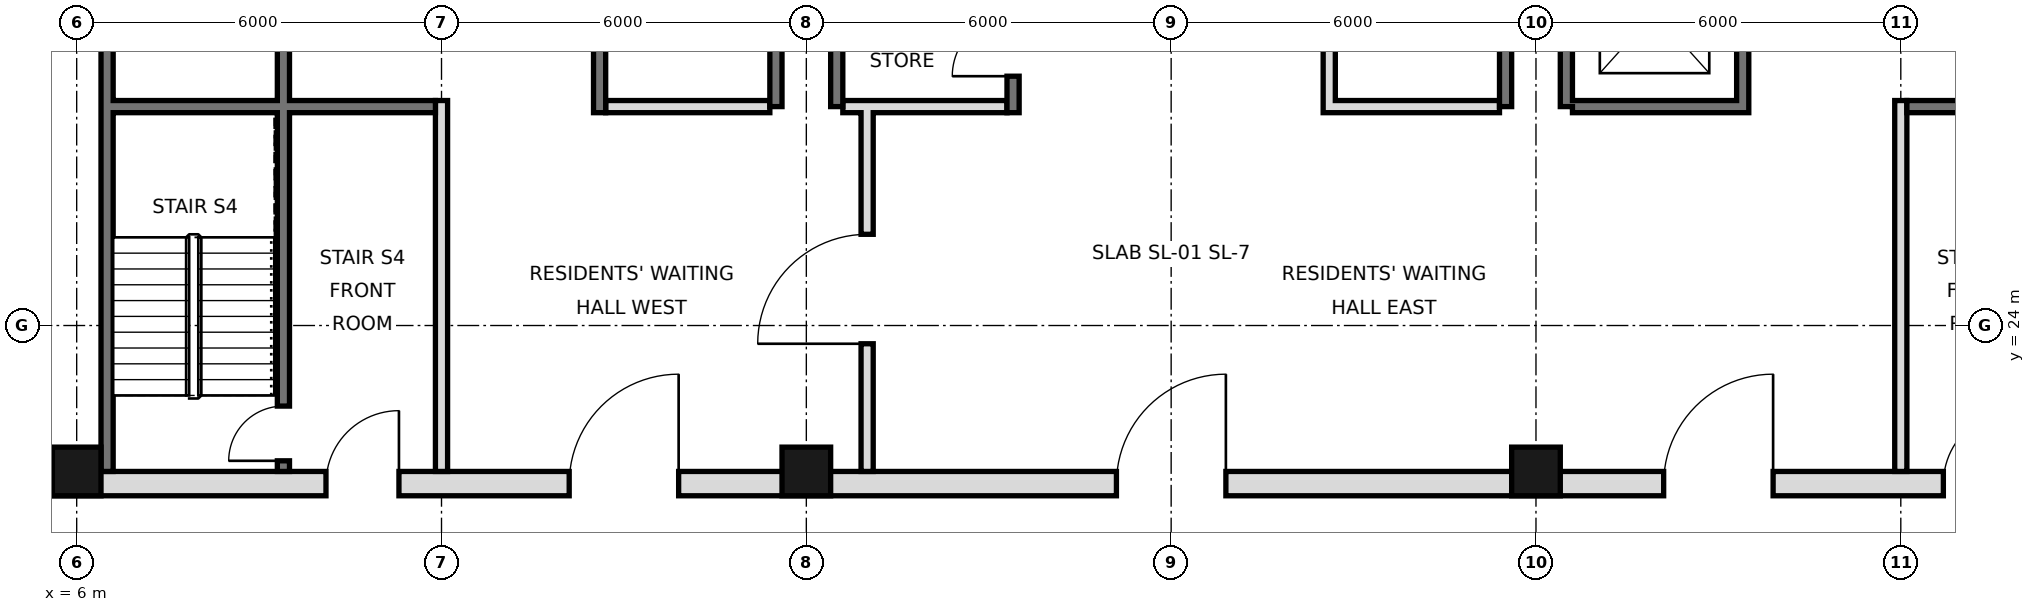
"""IFC4 building model, lengths in metres.
Left out: names, types, materials, properties, quantities, classifications, styles, units other than length and angle.
Written with IfcOpenShell. Run it as: python <this file> out.ifc"""

import sys

from ifc_helpers import new_model, si_unit, direction, frame, frame_2d, origin, origin_2d, place, context, subcontext, project, spatial, rectangle, hollow_rectangle, extrude, element, fill, save


model = new_model("IFC4")
c1 = context("Model", 3, precision=1e-05, world=origin(), true_north=direction((0.0, 1.0)))
c2 = subcontext(c1, "Body", "Model", "MODEL_VIEW")
j1 = project(units=[si_unit("LENGTHUNIT", "METRE"), si_unit("PLANEANGLEUNIT", "RADIAN")], contexts=[c1])
p1 = place(None, origin())
s1 = spatial("IfcSite", under=j1, at=p1, CompositionType="ELEMENT")
p2 = place(p1, origin())
s2 = spatial("IfcBuilding", under=s1, at=p2, CompositionType="ELEMENT")
p3 = place(p2, frame((0.0, 0.0, 243.2)))
s3 = spatial("IfcBuildingStorey", under=s2, at=p3, CompositionType="ELEMENT", Elevation=243.2)
for number, where, z_axis, x_axis in (
    (1, (6.0, 21.6, 0.0), (0.0, 0.0, 1.0), (1.0, 0.0, 0.0)),
    (2, (18.0, 21.6, 0.0), (0.0, 0.0, 1.0), (1.0, 0.0, 0.0)),
    (3, (30.0, 21.6, 0.0), (0.0, 0.0, 1.0), (1.0, 0.0, 0.0)),
):
    element("IfcColumn", number, at=place(p3, frame(where, z_axis=z_axis, x_axis=x_axis)), inside=s3, PredefinedType="COLUMN", context=c2, shape_type="SweptSolid", body=[
        extrude(hollow_rectangle(XDim=0.8, YDim=0.8, WallThickness=0.04, at=origin_2d()), origin(), (0.0, 0.0, 1.0), 3.6),
    ])
p4 = place(p3, frame((6.5, 21.6, 0.0), z_axis=(0.0, 0.0, 1.0), x_axis=(0.0, 1.0, 0.0)))
e4 = element("IfcWall", 4, at=p4, inside=s3, PredefinedType="SOLIDWALL", context=c2, shape_type="SweptSolid", body=[
    extrude(rectangle(XDim=23.5, YDim=0.2, at=frame_2d((11.75, 0.0))), origin(), (0.0, 0.0, 1.0), 3.42),
])
for number, where, z_axis, x_axis in (
    (5, (17.5, 27.6, 0.0), (0.0, 0.0, 1.0), (0.0, 1.0, 0.0)),
    (6, (18.5, 27.6, 0.0), (0.0, 0.0, 1.0), (0.0, 1.0, 0.0)),
    (7, (29.5, 27.6, 0.0), (0.0, 0.0, 1.0), (0.0, 1.0, 0.0)),
    (8, (30.5, 27.6, 0.0), (0.0, 0.0, 1.0), (0.0, 1.0, 0.0)),
):
    element("IfcWall", number, at=place(p3, frame(where, z_axis=z_axis, x_axis=x_axis)), inside=s3, PredefinedType="SOLIDWALL", context=c2, shape_type="SweptSolid", body=[
        extrude(rectangle(XDim=17.5, YDim=0.2, at=frame_2d((8.75, 0.0))), origin(), (0.0, 0.0, 1.0), 3.42),
    ])
p5 = place(p3, frame((5.6, 21.4, 0.0), z_axis=(0.0, 0.0, 1.0), x_axis=(1.0, 0.0, 0.0)))
e9 = element("IfcWall", 9, at=p5, inside=s3, PredefinedType="SOLIDWALL", context=c2, shape_type="SweptSolid", body=[
    extrude(rectangle(XDim=36.8, YDim=0.4, at=frame_2d((18.4, 0.0))), origin(), (0.0, 0.0, 1.0), 3.42),
])
p6 = place(p5, frame((8.5, 0.0, 0.0)))
e10 = element("IfcOpeningElement", 10, at=p6, cuts=e9, PredefinedType="OPENING", context=c2, shape_type="SweptSolid", body=[
    extrude(rectangle(XDim=1.8, YDim=2.1, at=frame_2d((0.9, 1.05))), frame((0.0, 0.21, 0.0), z_axis=(0.0, -1.0, 0.0), x_axis=(1.0, 0.0, 0.0)), (0.0, 0.0, 1.0), 0.42),
])
p7 = place(p5, frame((17.5, 0.0, 0.0)))
e11 = element("IfcOpeningElement", 11, at=p7, cuts=e9, PredefinedType="OPENING", context=c2, shape_type="SweptSolid", body=[
    extrude(rectangle(XDim=1.8, YDim=2.1, at=frame_2d((0.9, 1.05))), frame((0.0, 0.21, 0.0), z_axis=(0.0, -1.0, 0.0), x_axis=(1.0, 0.0, 0.0)), (0.0, 0.0, 1.0), 0.42),
])
p8 = place(p5, frame((26.5, 0.0, 0.0)))
e12 = element("IfcOpeningElement", 12, at=p8, cuts=e9, PredefinedType="OPENING", context=c2, shape_type="SweptSolid", body=[
    extrude(rectangle(XDim=1.8, YDim=2.1, at=frame_2d((0.9, 1.05))), frame((0.0, 0.21, 0.0), z_axis=(0.0, -1.0, 0.0), x_axis=(1.0, 0.0, 0.0)), (0.0, 0.0, 1.0), 0.42),
])
p9 = place(p5, frame((4.5, 0.0, 0.0)))
e13 = element("IfcOpeningElement", 13, at=p9, cuts=e9, PredefinedType="OPENING", context=c2, shape_type="SweptSolid", body=[
    extrude(rectangle(XDim=1.2, YDim=2.1, at=frame_2d((0.6, 1.05))), frame((0.0, 0.21, 0.0), z_axis=(0.0, -1.0, 0.0), x_axis=(1.0, 0.0, 0.0)), (0.0, 0.0, 1.0), 0.42),
])
p10 = place(p5, frame((31.1, 0.0, 0.0)))
e14 = element("IfcOpeningElement", 14, at=p10, cuts=e9, PredefinedType="OPENING", context=c2, shape_type="SweptSolid", body=[
    extrude(rectangle(XDim=1.2, YDim=2.1, at=frame_2d((0.6, 1.05))), frame((0.0, 0.21, 0.0), z_axis=(0.0, -1.0, 0.0), x_axis=(1.0, 0.0, 0.0)), (0.0, 0.0, 1.0), 0.42),
])
p11 = place(p3, frame((19.0, 21.6, 0.0), z_axis=(0.0, 0.0, 1.0), x_axis=(0.0, 1.0, 0.0)))
e15 = element("IfcWall", 15, at=p11, inside=s3, PredefinedType="PARTITIONING", context=c2, shape_type="SweptSolid", body=[
    extrude(rectangle(XDim=6.0, YDim=0.2, at=frame_2d((3.0, 0.0))), origin(), (0.0, 0.0, 1.0), 3.42),
])
p12 = place(p11, frame((2.1, 0.0, 0.0)))
e16 = element("IfcOpeningElement", 16, at=p12, cuts=e15, PredefinedType="OPENING", context=c2, shape_type="SweptSolid", body=[
    extrude(rectangle(XDim=1.8, YDim=2.1, at=frame_2d((0.9, 1.05))), frame((0.0, 0.11, 0.0), z_axis=(0.0, -1.0, 0.0), x_axis=(1.0, 0.0, 0.0)), (0.0, 0.0, 1.0), 0.22),
])
p13 = place(p3, frame((12.0, 21.6, 0.0), z_axis=(0.0, 0.0, 1.0), x_axis=(0.0, 1.0, 0.0)))
e17 = element("IfcWall", 17, at=p13, inside=s3, PredefinedType="PARTITIONING", context=c2, shape_type="SweptSolid", body=[
    extrude(rectangle(XDim=6.1, YDim=0.2, at=frame_2d((3.05, 0.0))), origin(), (0.0, 0.0, 1.0), 3.42),
])
p14 = place(p3, frame((14.6, 27.5, 0.0), z_axis=(0.0, 0.0, 1.0), x_axis=(0.0, 1.0, 0.0)))
e18 = element("IfcWall", 18, at=p14, inside=s3, PredefinedType="SOLIDWALL", context=c2, shape_type="SweptSolid", body=[
    extrude(rectangle(XDim=17.5, YDim=0.2, at=frame_2d((8.75, 0.0))), origin(), (0.0, 0.0, 1.0), 3.42),
])
p15 = place(p14, frame((15.4, 0.0, 0.0)))
e19 = element("IfcOpeningElement", 19, at=p15, cuts=e18, PredefinedType="OPENING", context=c2, shape_type="SweptSolid", body=[
    extrude(rectangle(XDim=1.1, YDim=2.1, at=frame_2d((0.55, 1.05))), frame((0.0, 0.11, 0.0), z_axis=(0.0, -1.0, 0.0), x_axis=(1.0, 0.0, 0.0)), (0.0, 0.0, 1.0), 0.22),
])
p16 = place(p14, frame((2.7, 0.0, 0.0)))
e20 = element("IfcOpeningElement", 20, at=p16, cuts=e18, PredefinedType="OPENING", context=c2, shape_type="SweptSolid", body=[
    extrude(rectangle(XDim=1.0, YDim=2.1, at=frame_2d((0.5, 1.05))), frame((0.0, 0.11, 0.0), z_axis=(0.0, -1.0, 0.0), x_axis=(1.0, 0.0, 0.0)), (0.0, 0.0, 1.0), 0.22),
])
p17 = place(p14, frame((9.9, 0.0, 0.0)))
e21 = element("IfcOpeningElement", 21, at=p17, cuts=e18, PredefinedType="OPENING", context=c2, shape_type="SweptSolid", body=[
    extrude(rectangle(XDim=0.9, YDim=2.1, at=frame_2d((0.45, 1.05))), frame((0.0, 0.11, 0.0), z_axis=(0.0, -1.0, 0.0), x_axis=(1.0, 0.0, 0.0)), (0.0, 0.0, 1.0), 0.22),
])
p18 = place(p3, frame((21.4, 27.5, 0.0), z_axis=(0.0, 0.0, 1.0), x_axis=(0.0, 1.0, 0.0)))
e22 = element("IfcWall", 22, at=p18, inside=s3, PredefinedType="SOLIDWALL", context=c2, shape_type="SweptSolid", body=[
    extrude(rectangle(XDim=17.5, YDim=0.2, at=frame_2d((8.75, 0.0))), origin(), (0.0, 0.0, 1.0), 3.42),
])
p19 = place(p18, frame((0.6, 0.0, 0.0)))
e23 = element("IfcOpeningElement", 23, at=p19, cuts=e22, PredefinedType="OPENING", context=c2, shape_type="SweptSolid", body=[
    extrude(rectangle(XDim=1.0, YDim=2.1, at=frame_2d((0.5, 1.05))), frame((0.0, 0.11, 0.0), z_axis=(0.0, -1.0, 0.0), x_axis=(1.0, 0.0, 0.0)), (0.0, 0.0, 1.0), 0.22),
])
p20 = place(p18, frame((3.7, 0.0, 0.0)))
e24 = element("IfcOpeningElement", 24, at=p20, cuts=e22, PredefinedType="OPENING", context=c2, shape_type="SweptSolid", body=[
    extrude(rectangle(XDim=1.0, YDim=2.1, at=frame_2d((0.5, 1.05))), frame((0.0, 0.11, 0.0), z_axis=(0.0, -1.0, 0.0), x_axis=(1.0, 0.0, 0.0)), (0.0, 0.0, 1.0), 0.22),
])
p21 = place(p18, frame((9.8, 0.0, 0.0)))
e25 = element("IfcOpeningElement", 25, at=p21, cuts=e22, PredefinedType="OPENING", context=c2, shape_type="SweptSolid", body=[
    extrude(rectangle(XDim=1.0, YDim=2.1, at=frame_2d((0.5, 1.05))), frame((0.0, 0.11, 0.0), z_axis=(0.0, -1.0, 0.0), x_axis=(1.0, 0.0, 0.0)), (0.0, 0.0, 1.0), 0.22),
])
p22 = place(p18, frame((7.4, 0.0, 0.0)))
e26 = element("IfcOpeningElement", 26, at=p22, cuts=e22, PredefinedType="OPENING", context=c2, shape_type="SweptSolid", body=[
    extrude(rectangle(XDim=0.9, YDim=2.1, at=frame_2d((0.45, 1.05))), frame((0.0, 0.11, 0.0), z_axis=(0.0, -1.0, 0.0), x_axis=(1.0, 0.0, 0.0)), (0.0, 0.0, 1.0), 0.22),
])
p23 = place(p3, frame((26.6, 27.5, 0.0), z_axis=(0.0, 0.0, 1.0), x_axis=(0.0, 1.0, 0.0)))
e27 = element("IfcWall", 27, at=p23, inside=s3, PredefinedType="SOLIDWALL", context=c2, shape_type="SweptSolid", body=[
    extrude(rectangle(XDim=17.5, YDim=0.2, at=frame_2d((8.75, 0.0))), origin(), (0.0, 0.0, 1.0), 3.42),
])
p24 = place(p23, frame((4.3, 0.0, 0.0)))
e28 = element("IfcOpeningElement", 28, at=p24, cuts=e27, PredefinedType="OPENING", context=c2, shape_type="SweptSolid", body=[
    extrude(rectangle(XDim=0.9, YDim=2.1, at=frame_2d((0.45, 1.05))), frame((0.0, 0.11, 0.0), z_axis=(0.0, -1.0, 0.0), x_axis=(1.0, 0.0, 0.0)), (0.0, 0.0, 1.0), 0.22),
])
p25 = place(p23, frame((10.35, 0.0, 0.0)))
e29 = element("IfcOpeningElement", 29, at=p25, cuts=e27, PredefinedType="OPENING", context=c2, shape_type="SweptSolid", body=[
    extrude(rectangle(XDim=1.0, YDim=2.1, at=frame_2d((0.5, 1.05))), frame((0.0, 0.11, 0.0), z_axis=(0.0, -1.0, 0.0), x_axis=(1.0, 0.0, 0.0)), (0.0, 0.0, 1.0), 0.22),
])
p26 = place(p3, frame((33.4, 27.5, 0.0), z_axis=(0.0, 0.0, 1.0), x_axis=(0.0, 1.0, 0.0)))
e30 = element("IfcWall", 30, at=p26, inside=s3, PredefinedType="SOLIDWALL", context=c2, shape_type="SweptSolid", body=[
    extrude(rectangle(XDim=17.5, YDim=0.2, at=frame_2d((8.75, 0.0))), origin(), (0.0, 0.0, 1.0), 3.42),
])
p27 = place(p26, frame((1.1, 0.0, 0.0)))
e31 = element("IfcOpeningElement", 31, at=p27, cuts=e30, PredefinedType="OPENING", context=c2, shape_type="SweptSolid", body=[
    extrude(rectangle(XDim=1.1, YDim=2.1, at=frame_2d((0.55, 1.05))), frame((0.0, 0.11, 0.0), z_axis=(0.0, -1.0, 0.0), x_axis=(1.0, 0.0, 0.0)), (0.0, 0.0, 1.0), 0.22),
])
p28 = place(p26, frame((4.2, 0.0, 0.0)))
e32 = element("IfcOpeningElement", 32, at=p28, cuts=e30, PredefinedType="OPENING", context=c2, shape_type="SweptSolid", body=[
    extrude(rectangle(XDim=1.1, YDim=2.1, at=frame_2d((0.55, 1.05))), frame((0.0, 0.11, 0.0), z_axis=(0.0, -1.0, 0.0), x_axis=(1.0, 0.0, 0.0)), (0.0, 0.0, 1.0), 0.22),
])
p29 = place(p26, frame((15.4, 0.0, 0.0)))
e33 = element("IfcOpeningElement", 33, at=p29, cuts=e30, PredefinedType="OPENING", context=c2, shape_type="SweptSolid", body=[
    extrude(rectangle(XDim=1.1, YDim=2.1, at=frame_2d((0.55, 1.05))), frame((0.0, 0.11, 0.0), z_axis=(0.0, -1.0, 0.0), x_axis=(1.0, 0.0, 0.0)), (0.0, 0.0, 1.0), 0.22),
])
p30 = place(p26, frame((9.9, 0.0, 0.0)))
e34 = element("IfcOpeningElement", 34, at=p30, cuts=e30, PredefinedType="OPENING", context=c2, shape_type="SweptSolid", body=[
    extrude(rectangle(XDim=0.9, YDim=2.1, at=frame_2d((0.45, 1.05))), frame((0.0, 0.11, 0.0), z_axis=(0.0, -1.0, 0.0), x_axis=(1.0, 0.0, 0.0)), (0.0, 0.0, 1.0), 0.22),
])
p31 = place(p3, frame((36.0, 21.6, 0.0), z_axis=(0.0, 0.0, 1.0), x_axis=(0.0, 1.0, 0.0)))
e35 = element("IfcWall", 35, at=p31, inside=s3, PredefinedType="PARTITIONING", context=c2, shape_type="SweptSolid", body=[
    extrude(rectangle(XDim=6.1, YDim=0.2, at=frame_2d((3.05, 0.0))), origin(), (0.0, 0.0, 1.0), 3.42),
])
p32 = place(p3, frame((9.4, 21.6, 0.0), z_axis=(0.0, 0.0, 1.0), x_axis=(0.0, 1.0, 0.0)))
e36 = element("IfcWall", 36, at=p32, inside=s3, PredefinedType="SOLIDWALL", context=c2, shape_type="SweptSolid", body=[
    extrude(rectangle(XDim=23.4, YDim=0.2, at=frame_2d((11.7, 0.0))), origin(), (0.0, 0.0, 1.0), 3.42),
])
p33 = place(p32, frame((7.95, 0.0, 0.0)))
e37 = element("IfcOpeningElement", 37, at=p33, cuts=e36, PredefinedType="OPENING", context=c2, shape_type="SweptSolid", body=[
    extrude(rectangle(XDim=1.0, YDim=2.1, at=frame_2d((0.5, 1.05))), frame((0.0, 0.11, 0.0), z_axis=(0.0, -1.0, 0.0), x_axis=(1.0, 0.0, 0.0)), (0.0, 0.0, 1.0), 0.22),
])
p34 = place(p32, frame((12.6, 0.0, 0.0)))
e38 = element("IfcOpeningElement", 38, at=p34, cuts=e36, PredefinedType="OPENING", context=c2, shape_type="SweptSolid", body=[
    extrude(rectangle(XDim=1.0, YDim=2.1, at=frame_2d((0.5, 1.05))), frame((0.0, 0.11, 0.0), z_axis=(0.0, -1.0, 0.0), x_axis=(1.0, 0.0, 0.0)), (0.0, 0.0, 1.0), 0.22),
])
p35 = place(p32, frame((15.7, 0.0, 0.0)))
e39 = element("IfcOpeningElement", 39, at=p35, cuts=e36, PredefinedType="OPENING", context=c2, shape_type="SweptSolid", body=[
    extrude(rectangle(XDim=1.0, YDim=2.1, at=frame_2d((0.5, 1.05))), frame((0.0, 0.11, 0.0), z_axis=(0.0, -1.0, 0.0), x_axis=(1.0, 0.0, 0.0)), (0.0, 0.0, 1.0), 0.22),
])
p36 = place(p32, frame((0.175, 0.0, 0.0)))
e40 = element("IfcOpeningElement", 40, at=p36, cuts=e36, PredefinedType="OPENING", context=c2, shape_type="SweptSolid", body=[
    extrude(rectangle(XDim=0.9, YDim=2.1, at=frame_2d((0.45, 1.05))), frame((0.0, 0.11, 0.0), z_axis=(0.0, -1.0, 0.0), x_axis=(1.0, 0.0, 0.0)), (0.0, 0.0, 1.0), 0.22),
])
for number, where, z_axis, x_axis in (
    (41, (14.7, 27.6, 0.0), (0.0, 0.0, 1.0), (1.0, 0.0, 0.0)),
    (42, (18.6, 27.6, 0.0), (0.0, 0.0, 1.0), (1.0, 0.0, 0.0)),
):
    element("IfcWall", number, at=place(p3, frame(where, z_axis=z_axis, x_axis=x_axis)), inside=s3, PredefinedType="PARTITIONING", context=c2, shape_type="SweptSolid", body=[
        extrude(rectangle(XDim=2.7, YDim=0.2, at=frame_2d((1.35, 0.0))), origin(), (0.0, 0.0, 1.0), 3.42),
    ])
for number, where, z_axis, x_axis in (
    (43, (26.7, 27.6, 0.0), (0.0, 0.0, 1.0), (1.0, 0.0, 0.0)),
    (44, (30.6, 27.6, 0.0), (0.0, 0.0, 1.0), (1.0, 0.0, 0.0)),
):
    element("IfcWall", number, at=place(p3, frame(where, z_axis=z_axis, x_axis=x_axis)), inside=s3, PredefinedType="SOLIDWALL", context=c2, shape_type="SweptSolid", body=[
        extrude(rectangle(XDim=2.7, YDim=0.2, at=frame_2d((1.35, 0.0))), origin(), (0.0, 0.0, 1.0), 3.42),
    ])
for number, where, z_axis, x_axis in (
    (45, (36.1, 27.6, 0.0), (0.0, 0.0, 1.0), (1.0, 0.0, 0.0)),
    (46, (6.6, 27.6, 0.0), (0.0, 0.0, 1.0), (1.0, 0.0, 0.0)),
):
    element("IfcWall", number, at=place(p3, frame(where, z_axis=z_axis, x_axis=x_axis)), inside=s3, PredefinedType="SOLIDWALL", context=c2, shape_type="SweptSolid", body=[
        extrude(rectangle(XDim=5.3, YDim=0.2, at=frame_2d((2.65, 0.0))), origin(), (0.0, 0.0, 1.0), 3.42),
    ])
p37 = place(p6, frame((1.8, 0.0, 0.0), z_axis=(0.0, 0.0, 1.0), x_axis=(-1.0, 0.0, 0.0)))
e47 = element("IfcDoor", 47, at=p37, inside=s3, OperationType="SINGLE_SWING_LEFT", PredefinedType="DOOR", context=c2, shape_type="SweptSolid", body=[
    extrude(rectangle(XDim=1.8, YDim=2.1, at=frame_2d((0.9, 1.05))), frame((0.0, 0.025, 0.0), z_axis=(0.0, -1.0, 0.0), x_axis=(1.0, 0.0, 0.0)), (0.0, 0.0, 1.0), 0.05),
])
fill(e10, e47)
p38 = place(p12, origin())
e48 = element("IfcDoor", 48, at=p38, inside=s3, OperationType="SINGLE_SWING_LEFT", PredefinedType="DOOR", context=c2, shape_type="SweptSolid", body=[
    extrude(rectangle(XDim=1.8, YDim=2.1, at=frame_2d((0.9, 1.05))), frame((0.0, 0.025, 0.0), z_axis=(0.0, -1.0, 0.0), x_axis=(1.0, 0.0, 0.0)), (0.0, 0.0, 1.0), 0.05),
])
fill(e16, e48)
p39 = place(p7, frame((1.8, 0.0, 0.0), z_axis=(0.0, 0.0, 1.0), x_axis=(-1.0, 0.0, 0.0)))
e49 = element("IfcDoor", 49, at=p39, inside=s3, OperationType="SINGLE_SWING_LEFT", PredefinedType="DOOR", context=c2, shape_type="SweptSolid", body=[
    extrude(rectangle(XDim=1.8, YDim=2.1, at=frame_2d((0.9, 1.05))), frame((0.0, 0.025, 0.0), z_axis=(0.0, -1.0, 0.0), x_axis=(1.0, 0.0, 0.0)), (0.0, 0.0, 1.0), 0.05),
])
fill(e11, e49)
p40 = place(p8, frame((1.8, 0.0, 0.0), z_axis=(0.0, 0.0, 1.0), x_axis=(-1.0, 0.0, 0.0)))
e50 = element("IfcDoor", 50, at=p40, inside=s3, OperationType="SINGLE_SWING_LEFT", PredefinedType="DOOR", context=c2, shape_type="SweptSolid", body=[
    extrude(rectangle(XDim=1.8, YDim=2.1, at=frame_2d((0.9, 1.05))), frame((0.0, 0.025, 0.0), z_axis=(0.0, -1.0, 0.0), x_axis=(1.0, 0.0, 0.0)), (0.0, 0.0, 1.0), 0.05),
])
fill(e12, e50)
p41 = place(p9, frame((1.2, 0.0, 0.0), z_axis=(0.0, 0.0, 1.0), x_axis=(-1.0, 0.0, 0.0)))
e51 = element("IfcDoor", 51, at=p41, inside=s3, OperationType="SINGLE_SWING_LEFT", PredefinedType="DOOR", context=c2, shape_type="SweptSolid", body=[
    extrude(rectangle(XDim=1.2, YDim=2.1, at=frame_2d((0.6, 1.05))), frame((0.0, 0.025, 0.0), z_axis=(0.0, -1.0, 0.0), x_axis=(1.0, 0.0, 0.0)), (0.0, 0.0, 1.0), 0.05),
])
fill(e13, e51)
p42 = place(p10, frame((1.2, 0.0, 0.0), z_axis=(0.0, 0.0, 1.0), x_axis=(-1.0, 0.0, 0.0)))
e52 = element("IfcDoor", 52, at=p42, inside=s3, OperationType="SINGLE_SWING_LEFT", PredefinedType="DOOR", context=c2, shape_type="SweptSolid", body=[
    extrude(rectangle(XDim=1.2, YDim=2.1, at=frame_2d((0.6, 1.05))), frame((0.0, 0.025, 0.0), z_axis=(0.0, -1.0, 0.0), x_axis=(1.0, 0.0, 0.0)), (0.0, 0.0, 1.0), 0.05),
])
fill(e14, e52)
p43 = place(p19, origin())
e53 = element("IfcDoor", 53, at=p43, inside=s3, OperationType="SINGLE_SWING_LEFT", PredefinedType="DOOR", context=c2, shape_type="SweptSolid", body=[
    extrude(rectangle(XDim=1.0, YDim=2.1, at=frame_2d((0.5, 1.05))), frame((0.0, 0.025, 0.0), z_axis=(0.0, -1.0, 0.0), x_axis=(1.0, 0.0, 0.0)), (0.0, 0.0, 1.0), 0.05),
])
fill(e23, e53)
p44 = place(p36, origin())
e54 = element("IfcDoor", 54, at=p44, inside=s3, OperationType="SINGLE_SWING_LEFT", PredefinedType="DOOR", context=c2, shape_type="SweptSolid", body=[
    extrude(rectangle(XDim=0.9, YDim=2.1, at=frame_2d((0.45, 1.05))), frame((0.0, 0.025, 0.0), z_axis=(0.0, -1.0, 0.0), x_axis=(1.0, 0.0, 0.0)), (0.0, 0.0, 1.0), 0.05),
])
fill(e40, e54)
save(model, sys.argv[1])
